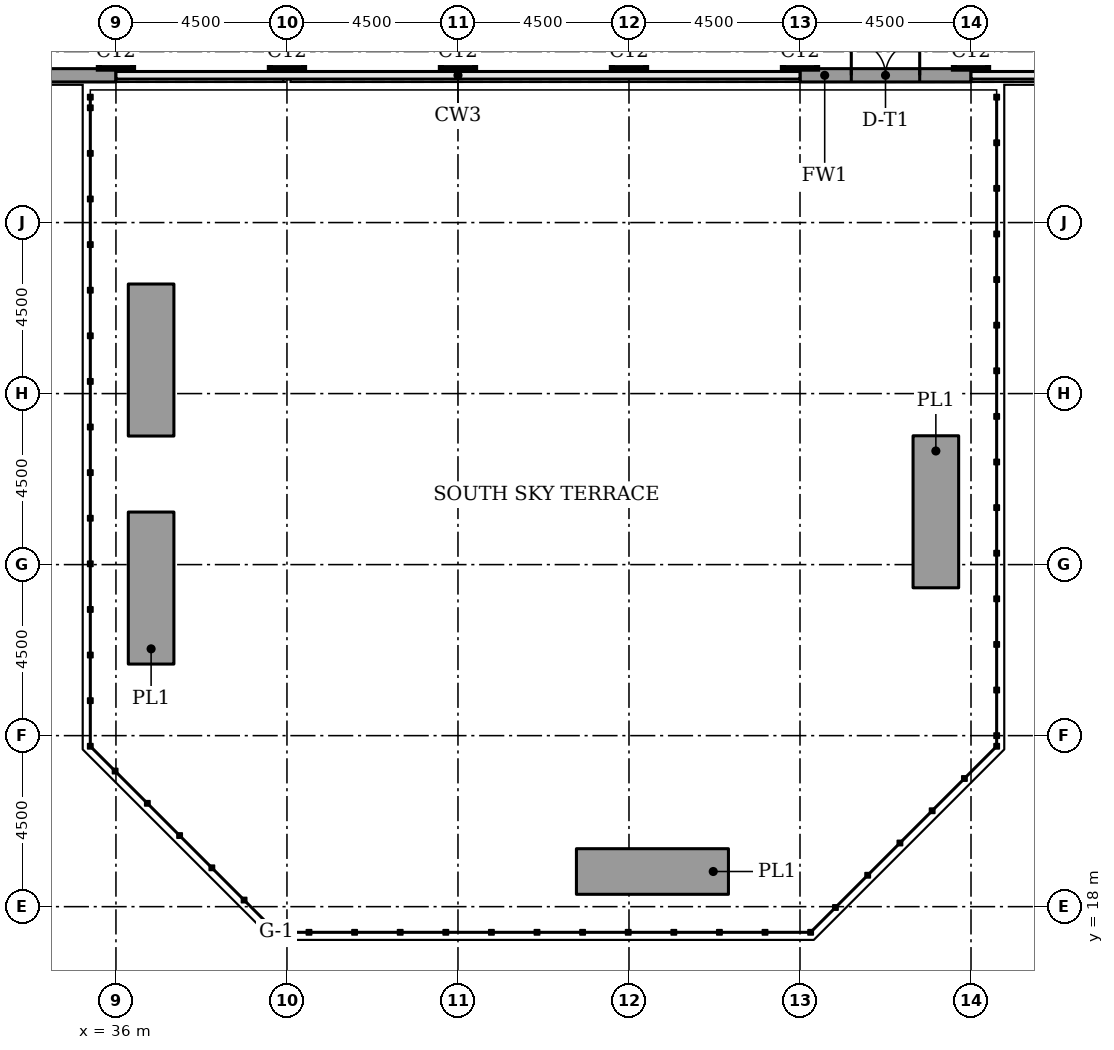
"""IFC4 building model, lengths in metres.
Left out: names, types, materials, properties, quantities, classifications, styles, units other than length and angle.
Written with IfcOpenShell. Run it as: python <this file> out.ifc"""

import sys

from ifc_helpers import new_model, si_unit, direction, frame, frame_2d, origin, origin_2d, place, context, subcontext, project, spatial, rectangle, extrude, element, fill, save


model = new_model("IFC4")
c1 = context("Model", 3, precision=1e-05, world=origin(), true_north=direction((0.0, 1.0)))
c2 = subcontext(c1, "Body", "Model", "MODEL_VIEW")
j1 = project(units=[si_unit("LENGTHUNIT", "METRE"), si_unit("PLANEANGLEUNIT", "RADIAN")], contexts=[c1])
p1 = place(None, origin())
s1 = spatial("IfcSite", under=j1, at=p1, CompositionType="ELEMENT")
p2 = place(p1, origin())
s2 = spatial("IfcBuilding", under=s1, at=p2, CompositionType="ELEMENT")
p3 = place(p2, frame((0.0, 0.0, 143.1)))
s3 = spatial("IfcBuildingStorey", under=s2, at=p3, CompositionType="ELEMENT", Elevation=143.1)
for number, where, z_axis, x_axis in (
    (1, (36.0, 40.5, 0.0), (0.0, 0.0, 1.0), (1.0, 0.0, 0.0)),
    (2, (40.5, 40.5, 0.0), (0.0, 0.0, 1.0), (1.0, 0.0, 0.0)),
    (3, (45.0, 40.5, 0.0), (0.0, 0.0, 1.0), (1.0, 0.0, 0.0)),
    (4, (49.5, 40.5, 0.0), (0.0, 0.0, 1.0), (1.0, 0.0, 0.0)),
    (5, (54.0, 40.5, 0.0), (0.0, 0.0, 1.0), (1.0, 0.0, 0.0)),
    (6, (58.5, 40.5, 0.0), (0.0, 0.0, 1.0), (1.0, 0.0, 0.0)),
):
    element("IfcColumn", number, at=place(p3, frame(where, z_axis=z_axis, x_axis=x_axis)), inside=s3, PredefinedType="COLUMN", context=c2, shape_type="SweptSolid", body=[
        extrude(rectangle(XDim=0.9, YDim=0.9, at=origin_2d()), origin(), (0.0, 0.0, 1.0), 4.6),
    ])
p4 = place(p3, frame((54.0, 39.875, 0.0), z_axis=(0.0, 0.0, 1.0), x_axis=(1.0, 0.0, 0.0)))
e7 = element("IfcWall", 7, at=p4, inside=s3, PredefinedType="STANDARD", context=c2, shape_type="SweptSolid", body=[
    extrude(rectangle(XDim=4.5, YDim=0.35, at=frame_2d((2.25, 0.0))), origin(), (0.0, 0.0, 1.0), 4.425),
])
p5 = place(p4, frame((1.35, 0.0, 0.0)))
e8 = element("IfcOpeningElement", 8, at=p5, cuts=e7, PredefinedType="OPENING", context=c2, shape_type="SweptSolid", body=[
    extrude(rectangle(XDim=1.8, YDim=2.4, at=frame_2d((0.9, 1.2))), frame((0.0, 0.185, 0.0), z_axis=(0.0, -1.0, 0.0), x_axis=(1.0, 0.0, 0.0)), (0.0, 0.0, 1.0), 0.37),
])
p6 = place(p3, frame((17.669, 39.875, 0.0), z_axis=(0.0, 0.0, 1.0), x_axis=(1.0, 0.0, 0.0)))
e9 = element("IfcWall", 9, at=p6, inside=s3, PredefinedType="STANDARD", context=c2, shape_type="SweptSolid", body=[
    extrude(rectangle(XDim=18.331, YDim=0.35, at=frame_2d((9.166, 0.0))), origin(), (0.0, 0.0, 1.0), 4.425),
])
p7 = place(p6, frame((5.431, 0.0, 0.9)))
e10 = element("IfcOpeningElement", 10, at=p7, cuts=e9, PredefinedType="OPENING", context=c2, shape_type="SweptSolid", body=[
    extrude(rectangle(XDim=3.3, YDim=2.7, at=frame_2d((1.65, 1.35))), frame((0.0, 0.185, 0.0), z_axis=(0.0, -1.0, 0.0), x_axis=(1.0, 0.0, 0.0)), (0.0, 0.0, 1.0), 0.37),
])
p8 = place(p6, frame((9.931, 0.0, 0.9)))
e11 = element("IfcOpeningElement", 11, at=p8, cuts=e9, PredefinedType="OPENING", context=c2, shape_type="SweptSolid", body=[
    extrude(rectangle(XDim=3.3, YDim=2.7, at=frame_2d((1.65, 1.35))), frame((0.0, 0.185, 0.0), z_axis=(0.0, -1.0, 0.0), x_axis=(1.0, 0.0, 0.0)), (0.0, 0.0, 1.0), 0.37),
])
for number, where, z_axis, x_axis in (
    (12, (57.575, 30.39, 0.0), (0.0, 0.0, 1.0), (0.0, -1.0, 0.0)),
    (13, (52.117, 18.925, 0.0), (0.0, 0.0, 1.0), (-1.0, 0.0, 0.0)),
    (14, (36.925, 24.383, 0.0), (0.0, 0.0, 1.0), (0.0, 1.0, 0.0)),
    (15, (36.925, 30.383, 0.0), (0.0, 0.0, 1.0), (0.0, 1.0, 0.0)),
):
    element("IfcWall", number, at=place(p3, frame(where, z_axis=z_axis, x_axis=x_axis)), inside=s3, PredefinedType="STANDARD", context=c2, shape_type="SweptSolid", body=[
        extrude(rectangle(XDim=4.0, YDim=1.2, at=frame_2d((2.0, 0.0))), origin(), (0.0, 0.0, 1.0), 0.6),
    ])
p9 = place(p5, origin())
e16 = element("IfcDoor", 16, at=p9, inside=s3, OperationType="DOUBLE_DOOR_SINGLE_SWING", PredefinedType="DOOR", context=c2, shape_type="SweptSolid", body=[
    extrude(rectangle(XDim=1.8, YDim=2.4, at=frame_2d((0.9, 1.2))), frame((0.0, 0.08, 0.0), z_axis=(0.0, -1.0, 0.0), x_axis=(1.0, 0.0, 0.0)), (0.0, 0.0, 1.0), 0.05),
])
fill(e8, e16)
save(model, sys.argv[1])
